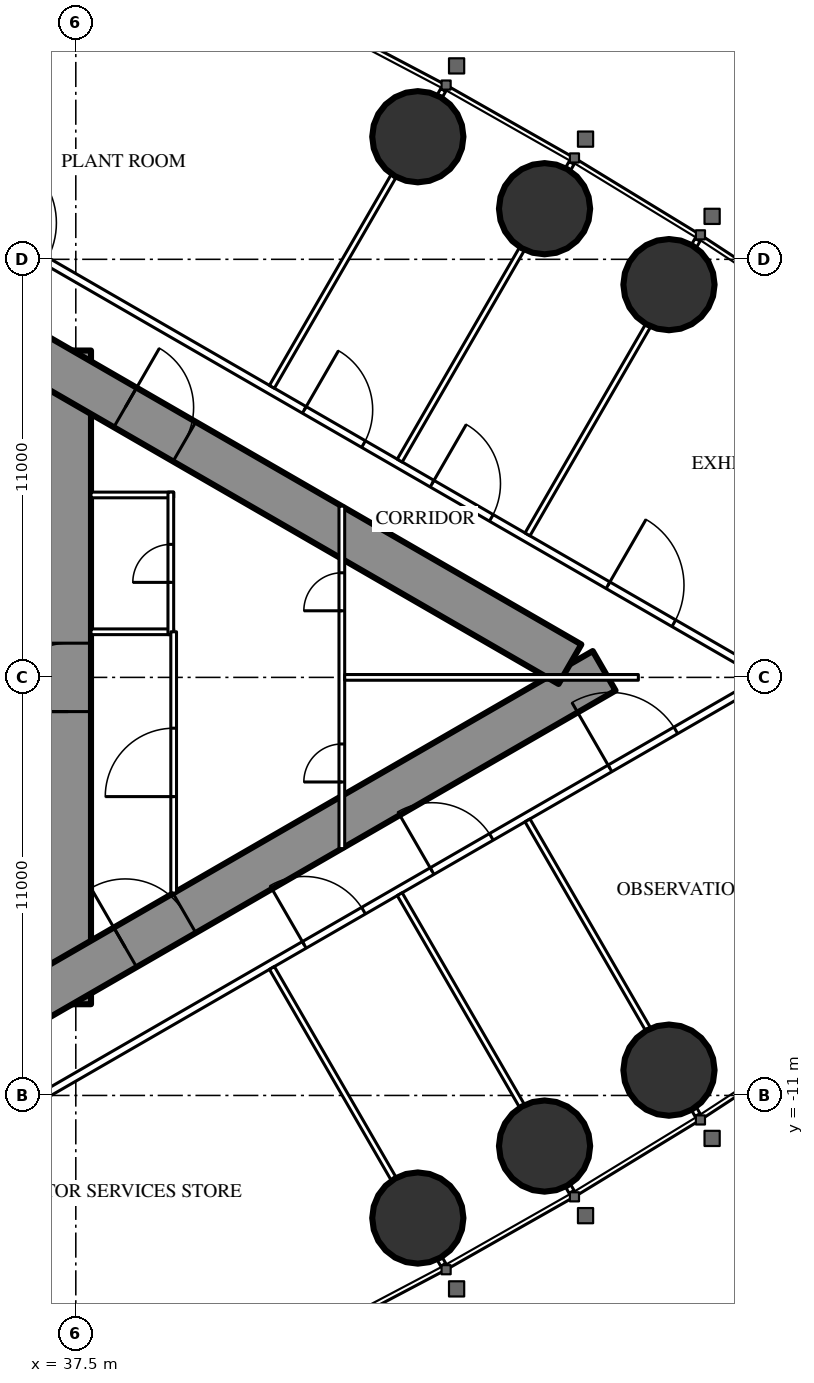
"""IFC4 building model, lengths in metres.
Left out: names, types, materials, properties, quantities, classifications, styles, units other than length and angle.
Written with IfcOpenShell. Run it as: python <this file> out.ifc"""

import sys

from ifc_helpers import new_model, si_unit, direction, frame, frame_2d, origin, origin_2d, place, context, subcontext, project, spatial, rectangle, circle, extrude, element, fill, save


model = new_model("IFC4")
c1 = context("Model", 3, precision=1e-05, world=origin(), true_north=direction((0.0, 1.0)))
c2 = subcontext(c1, "Body", "Model", "MODEL_VIEW")
j1 = project(units=[si_unit("LENGTHUNIT", "METRE"), si_unit("PLANEANGLEUNIT", "RADIAN")], contexts=[c1])
p1 = place(None, origin())
s1 = spatial("IfcSite", under=j1, at=p1, CompositionType="ELEMENT")
p2 = place(p1, origin())
s2 = spatial("IfcBuilding", under=s1, at=p2, CompositionType="ELEMENT")
p3 = place(p2, frame((0.0, 0.0, 257.3)))
s3 = spatial("IfcBuildingStorey", under=s2, at=p3, CompositionType="ELEMENT", Elevation=257.3)
for number, where, z_axis, x_axis in (
    (1, (53.108, 10.334, 0.0), (0.0, 0.0, 1.0), (1.0, 0.0, 0.0)),
    (2, (49.834, 12.332, 0.0), (0.0, 0.0, 1.0), (1.0, 0.0, 0.0)),
    (3, (46.499, 14.226, 0.0), (0.0, 0.0, 1.0), (1.0, 0.0, 0.0)),
    (4, (46.499, -14.226, 0.0), (0.0, 0.0, 1.0), (1.0, 0.0, 0.0)),
    (5, (49.834, -12.332, 0.0), (0.0, 0.0, 1.0), (1.0, 0.0, 0.0)),
    (6, (53.108, -10.334, 0.0), (0.0, 0.0, 1.0), (1.0, 0.0, 0.0)),
):
    element("IfcColumn", number, at=place(p3, frame(where, z_axis=z_axis, x_axis=x_axis)), inside=s3, PredefinedType="COLUMN", context=c2, shape_type="SweptSolid", body=[
        extrude(circle(Radius=1.2, at=origin_2d()), origin(), (0.0, 0.0, 1.0), 6.0),
    ])
p4 = place(p3, frame((37.3, -8.6, 0.0), z_axis=(0.0, 0.0, 1.0), x_axis=(0.0, 1.0, 0.0)))
e7 = element("IfcWall", 7, at=p4, inside=s3, PredefinedType="SHEAR", context=c2, shape_type="SweptSolid", body=[
    extrude(rectangle(XDim=17.2, YDim=1.2, at=frame_2d((8.6, 0.0))), origin(), (0.0, 0.0, 1.0), 6.0),
])
p5 = place(p4, frame((7.7, 0.0, 0.0)))
e8 = element("IfcOpeningElement", 8, at=p5, cuts=e7, PredefinedType="OPENING", context=c2, shape_type="SweptSolid", body=[
    extrude(rectangle(XDim=1.8, YDim=2.2, at=frame_2d((0.9, 1.1))), frame((0.0, 0.61, 0.0), z_axis=(0.0, -1.0, 0.0), x_axis=(1.0, 0.0, 0.0)), (0.0, 0.0, 1.0), 1.22),
])
p6 = place(p3, frame((27.2, -13.8, 0.0), z_axis=(0.0, 0.0, 1.0), x_axis=(0.866027159892, 0.499996958321, 0.0)))
e9 = element("IfcWall", 9, at=p6, inside=s3, PredefinedType="SHEAR", context=c2, shape_type="SweptSolid", body=[
    extrude(rectangle(XDim=27.947, YDim=1.2, at=frame_2d((13.973, 0.0))), origin(), (0.0, 0.0, 1.0), 6.0),
])
p7 = place(p6, frame((4.6, 0.0, 0.0)))
e10 = element("IfcOpeningElement", 10, at=p7, cuts=e9, PredefinedType="OPENING", context=c2, shape_type="SweptSolid", body=[
    extrude(rectangle(XDim=1.0, YDim=2.2, at=frame_2d((0.5, 1.1))), frame((0.0, 0.61, 0.0), z_axis=(0.0, -1.0, 0.0), x_axis=(1.0, 0.0, 0.0)), (0.0, 0.0, 1.0), 1.22),
])
p8 = place(p6, frame((13.395, 0.0, 0.0)))
e11 = element("IfcOpeningElement", 11, at=p8, cuts=e9, PredefinedType="OPENING", context=c2, shape_type="SweptSolid", body=[
    extrude(rectangle(XDim=1.8, YDim=2.2, at=frame_2d((0.9, 1.1))), frame((0.0, 0.61, 0.0), z_axis=(0.0, -1.0, 0.0), x_axis=(1.0, 0.0, 0.0)), (0.0, 0.0, 1.0), 1.22),
])
p9 = place(p3, frame((27.2, 13.8, 0.0), z_axis=(0.0, 0.0, 1.0), x_axis=(0.866024515034, -0.500001539357, 0.0)))
e12 = element("IfcWall", 12, at=p9, inside=s3, PredefinedType="SHEAR", context=c2, shape_type="SweptSolid", body=[
    extrude(rectangle(XDim=26.907, YDim=1.2, at=frame_2d((13.454, 0.0))), origin(), (0.0, 0.0, 1.0), 6.0),
])
p10 = place(p9, frame((4.6, 0.0, 0.0)))
e13 = element("IfcOpeningElement", 13, at=p10, cuts=e12, PredefinedType="OPENING", context=c2, shape_type="SweptSolid", body=[
    extrude(rectangle(XDim=1.0, YDim=2.2, at=frame_2d((0.5, 1.1))), frame((0.0, 0.61, 0.0), z_axis=(0.0, -1.0, 0.0), x_axis=(1.0, 0.0, 0.0)), (0.0, 0.0, 1.0), 1.22),
])
p11 = place(p9, frame((13.395, 0.0, 0.0)))
e14 = element("IfcOpeningElement", 14, at=p11, cuts=e12, PredefinedType="OPENING", context=c2, shape_type="SweptSolid", body=[
    extrude(rectangle(XDim=1.8, YDim=2.2, at=frame_2d((0.9, 1.1))), frame((0.0, 0.61, 0.0), z_axis=(0.0, -1.0, 0.0), x_axis=(1.0, 0.0, 0.0)), (0.0, 0.0, 1.0), 1.22),
])
p12 = place(p3, frame((28.907, -15.47, 0.0), z_axis=(0.0, 0.0, 1.0), x_axis=(0.866023700353, 0.500002950419, 0.0)))
e15 = element("IfcWall", 15, at=p12, inside=s3, PredefinedType="PARTITIONING", context=c2, shape_type="SweptSolid", body=[
    extrude(rectangle(XDim=30.941, YDim=0.2, at=frame_2d((15.47, 0.0))), origin(), (0.0, 0.0, 1.0), 5.75),
])
p13 = place(p12, frame((7.024, 0.0, 0.0)))
e16 = element("IfcOpeningElement", 16, at=p13, cuts=e15, PredefinedType="OPENING", context=c2, shape_type="SweptSolid", body=[
    extrude(rectangle(XDim=2.0, YDim=2.4, at=frame_2d((1.0, 1.2))), frame((0.0, 0.11, 0.0), z_axis=(0.0, -1.0, 0.0), x_axis=(1.0, 0.0, 0.0)), (0.0, 0.0, 1.0), 0.22),
])
p14 = place(p12, frame((16.865, 0.0, 0.0)))
e17 = element("IfcOpeningElement", 17, at=p14, cuts=e15, PredefinedType="OPENING", context=c2, shape_type="SweptSolid", body=[
    extrude(rectangle(XDim=1.8, YDim=2.2, at=frame_2d((0.9, 1.1))), frame((0.0, 0.11, 0.0), z_axis=(0.0, -1.0, 0.0), x_axis=(1.0, 0.0, 0.0)), (0.0, 0.0, 1.0), 0.22),
])
p15 = place(p12, frame((20.748, 0.0, 0.0)))
e18 = element("IfcOpeningElement", 18, at=p15, cuts=e15, PredefinedType="OPENING", context=c2, shape_type="SweptSolid", body=[
    extrude(rectangle(XDim=1.8, YDim=2.2, at=frame_2d((0.9, 1.1))), frame((0.0, 0.11, 0.0), z_axis=(0.0, -1.0, 0.0), x_axis=(1.0, 0.0, 0.0)), (0.0, 0.0, 1.0), 0.22),
])
p16 = place(p12, frame((26.152, 0.0, 0.0)))
e19 = element("IfcOpeningElement", 19, at=p16, cuts=e15, PredefinedType="OPENING", context=c2, shape_type="SweptSolid", body=[
    extrude(rectangle(XDim=2.0, YDim=2.4, at=frame_2d((1.0, 1.2))), frame((0.0, 0.11, 0.0), z_axis=(0.0, -1.0, 0.0), x_axis=(1.0, 0.0, 0.0)), (0.0, 0.0, 1.0), 0.22),
])
p17 = place(p3, frame((28.907, 15.47, 0.0), z_axis=(0.0, 0.0, 1.0), x_axis=(0.866025841386, -0.499999242051, 0.0)))
e20 = element("IfcWall", 20, at=p17, inside=s3, PredefinedType="PARTITIONING", context=c2, shape_type="SweptSolid", body=[
    extrude(rectangle(XDim=30.821, YDim=0.2, at=frame_2d((15.41, 0.0))), origin(), (0.0, 0.0, 1.0), 5.75),
])
p18 = place(p17, frame((26.092, 0.0, 0.0)))
e21 = element("IfcOpeningElement", 21, at=p18, cuts=e20, PredefinedType="OPENING", context=c2, shape_type="SweptSolid", body=[
    extrude(rectangle(XDim=2.0, YDim=2.4, at=frame_2d((1.0, 1.2))), frame((0.0, 0.11, 0.0), z_axis=(0.0, -1.0, 0.0), x_axis=(1.0, 0.0, 0.0)), (0.0, 0.0, 1.0), 0.22),
])
p19 = place(p17, frame((20.748, 0.0, 0.0)))
e22 = element("IfcOpeningElement", 22, at=p19, cuts=e20, PredefinedType="OPENING", context=c2, shape_type="SweptSolid", body=[
    extrude(rectangle(XDim=1.8, YDim=2.2, at=frame_2d((0.9, 1.1))), frame((0.0, 0.11, 0.0), z_axis=(0.0, -1.0, 0.0), x_axis=(1.0, 0.0, 0.0)), (0.0, 0.0, 1.0), 0.22),
])
p20 = place(p17, frame((16.865, 0.0, 0.0)))
e23 = element("IfcOpeningElement", 23, at=p20, cuts=e20, PredefinedType="OPENING", context=c2, shape_type="SweptSolid", body=[
    extrude(rectangle(XDim=1.8, YDim=2.2, at=frame_2d((0.9, 1.1))), frame((0.0, 0.11, 0.0), z_axis=(0.0, -1.0, 0.0), x_axis=(1.0, 0.0, 0.0)), (0.0, 0.0, 1.0), 0.22),
])
p21 = place(p17, frame((7.024, 0.0, 0.0)))
e24 = element("IfcOpeningElement", 24, at=p21, cuts=e20, PredefinedType="OPENING", context=c2, shape_type="SweptSolid", body=[
    extrude(rectangle(XDim=2.0, YDim=2.4, at=frame_2d((1.0, 1.2))), frame((0.0, 0.11, 0.0), z_axis=(0.0, -1.0, 0.0), x_axis=(1.0, 0.0, 0.0)), (0.0, 0.0, 1.0), 0.22),
])
p22 = place(p3, frame((42.66, -7.646, 0.0), z_axis=(0.0, 0.0, 1.0), x_axis=(0.499996592859, -0.866027370889, 0.0)))
e25 = element("IfcWall", 25, at=p22, inside=s3, PredefinedType="PARTITIONING", context=c2, shape_type="SweptSolid", body=[
    extrude(rectangle(XDim=6.398, YDim=0.15, at=frame_2d((3.199, 0.0))), origin(), (0.0, 0.0, 1.0), 4.85),
])
p23 = place(p3, frame((47.079, -15.3, 0.0), z_axis=(0.0, 0.0, 1.0), x_axis=(0.499212083968, -0.866479829667, 0.0)))
e26 = element("IfcWall", 26, at=p23, inside=s3, PredefinedType="PARTITIONING", context=c2, shape_type="SweptSolid", body=[
    extrude(rectangle(XDim=0.179, YDim=0.15, at=frame_2d((0.09, 0.0))), origin(), (0.0, 0.0, 1.0), 4.85),
])
p24 = place(p3, frame((46.023, -5.704, 0.0), z_axis=(0.0, 0.0, 1.0), x_axis=(0.499984478165, -0.866034365135, 0.0)))
e27 = element("IfcWall", 27, at=p24, inside=s3, PredefinedType="PARTITIONING", context=c2, shape_type="SweptSolid", body=[
    extrude(rectangle(XDim=6.426, YDim=0.15, at=frame_2d((3.213, 0.0))), origin(), (0.0, 0.0, 1.0), 4.85),
])
p25 = place(p3, frame((50.456, -13.382, 0.0), z_axis=(0.0, 0.0, 1.0), x_axis=(0.500661834965, -0.865642955848, 0.0)))
e28 = element("IfcWall", 28, at=p25, inside=s3, PredefinedType="PARTITIONING", context=c2, shape_type="SweptSolid", body=[
    extrude(rectangle(XDim=0.18, YDim=0.15, at=frame_2d((0.09, 0.0))), origin(), (0.0, 0.0, 1.0), 4.85),
])
p26 = place(p3, frame((49.385, -3.763, 0.0), z_axis=(0.0, 0.0, 1.0), x_axis=(0.499999447814, -0.866025722589, 0.0)))
e29 = element("IfcWall", 29, at=p26, inside=s3, PredefinedType="PARTITIONING", context=c2, shape_type="SweptSolid", body=[
    extrude(rectangle(XDim=6.333, YDim=0.15, at=frame_2d((3.166, 0.0))), origin(), (0.0, 0.0, 1.0), 4.85),
])
p27 = place(p3, frame((53.771, -11.36, 0.0), z_axis=(0.0, 0.0, 1.0), x_axis=(0.499524978789, -0.866299483762, 0.0)))
e30 = element("IfcWall", 30, at=p27, inside=s3, PredefinedType="PARTITIONING", context=c2, shape_type="SweptSolid", body=[
    extrude(rectangle(XDim=0.178, YDim=0.15, at=frame_2d((0.089, 0.0))), origin(), (0.0, 0.0, 1.0), 4.85),
])
p28 = place(p3, frame((42.66, 7.646, 0.0), z_axis=(0.0, 0.0, 1.0), x_axis=(0.499996592859, 0.866027370889, 0.0)))
e31 = element("IfcWall", 31, at=p28, inside=s3, PredefinedType="PARTITIONING", context=c2, shape_type="SweptSolid", body=[
    extrude(rectangle(XDim=6.398, YDim=0.15, at=frame_2d((3.199, 0.0))), origin(), (0.0, 0.0, 1.0), 4.85),
])
p29 = place(p3, frame((47.079, 15.3, 0.0), z_axis=(0.0, 0.0, 1.0), x_axis=(0.499212083968, 0.866479829667, 0.0)))
e32 = element("IfcWall", 32, at=p29, inside=s3, PredefinedType="PARTITIONING", context=c2, shape_type="SweptSolid", body=[
    extrude(rectangle(XDim=0.179, YDim=0.15, at=frame_2d((0.09, 0.0))), origin(), (0.0, 0.0, 1.0), 4.85),
])
p30 = place(p3, frame((46.023, 5.704, 0.0), z_axis=(0.0, 0.0, 1.0), x_axis=(0.499984478165, 0.866034365135, 0.0)))
e33 = element("IfcWall", 33, at=p30, inside=s3, PredefinedType="PARTITIONING", context=c2, shape_type="SweptSolid", body=[
    extrude(rectangle(XDim=6.426, YDim=0.15, at=frame_2d((3.213, 0.0))), origin(), (0.0, 0.0, 1.0), 4.85),
])
p31 = place(p3, frame((50.456, 13.382, 0.0), z_axis=(0.0, 0.0, 1.0), x_axis=(0.500661834965, 0.865642955848, 0.0)))
e34 = element("IfcWall", 34, at=p31, inside=s3, PredefinedType="PARTITIONING", context=c2, shape_type="SweptSolid", body=[
    extrude(rectangle(XDim=0.18, YDim=0.15, at=frame_2d((0.09, 0.0))), origin(), (0.0, 0.0, 1.0), 4.85),
])
p32 = place(p3, frame((49.385, 3.763, 0.0), z_axis=(0.0, 0.0, 1.0), x_axis=(0.499999447814, 0.866025722589, 0.0)))
e35 = element("IfcWall", 35, at=p32, inside=s3, PredefinedType="PARTITIONING", context=c2, shape_type="SweptSolid", body=[
    extrude(rectangle(XDim=6.333, YDim=0.15, at=frame_2d((3.166, 0.0))), origin(), (0.0, 0.0, 1.0), 4.85),
])
p33 = place(p3, frame((53.771, 11.36, 0.0), z_axis=(0.0, 0.0, 1.0), x_axis=(0.499524978789, 0.866299483762, 0.0)))
e36 = element("IfcWall", 36, at=p33, inside=s3, PredefinedType="PARTITIONING", context=c2, shape_type="SweptSolid", body=[
    extrude(rectangle(XDim=0.178, YDim=0.15, at=frame_2d((0.089, 0.0))), origin(), (0.0, 0.0, 1.0), 4.85),
])
for number, where, z_axis, x_axis in (
    (37, (37.9, 1.2, 0.0), (0.0, 0.0, 1.0), (1.0, 0.0, 0.0)),
    (38, (37.9, 4.8, 0.0), (0.0, 0.0, 1.0), (1.0, 0.0, 0.0)),
):
    element("IfcWall", number, at=place(p3, frame(where, z_axis=z_axis, x_axis=x_axis)), inside=s3, PredefinedType="PARTITIONING", context=c2, shape_type="SweptSolid", body=[
        extrude(rectangle(XDim=2.175, YDim=0.15, at=frame_2d((1.087, 0.0))), origin(), (0.0, 0.0, 1.0), 5.75),
    ])
p34 = place(p3, frame((40.0, 1.125, 0.0), z_axis=(0.0, 0.0, 1.0), x_axis=(0.0, 1.0, 0.0)))
e39 = element("IfcWall", 39, at=p34, inside=s3, PredefinedType="PARTITIONING", context=c2, shape_type="SweptSolid", body=[
    extrude(rectangle(XDim=3.75, YDim=0.15, at=frame_2d((1.875, 0.0))), origin(), (0.0, 0.0, 1.0), 5.75),
])
p35 = place(p34, frame((1.375, 0.0, 0.0)))
e40 = element("IfcOpeningElement", 40, at=p35, cuts=e39, PredefinedType="OPENING", context=c2, shape_type="SweptSolid", body=[
    extrude(rectangle(XDim=1.0, YDim=2.2, at=frame_2d((0.5, 1.1))), frame((0.0, 0.085, 0.0), z_axis=(0.0, -1.0, 0.0), x_axis=(1.0, 0.0, 0.0)), (0.0, 0.0, 1.0), 0.17),
])
p36 = place(p3, frame((40.075, -5.674, 0.0), z_axis=(0.0, 0.0, 1.0), x_axis=(0.0, 1.0, 0.0)))
e41 = element("IfcWall", 41, at=p36, inside=s3, PredefinedType="PARTITIONING", context=c2, shape_type="SweptSolid", body=[
    extrude(rectangle(XDim=6.874, YDim=0.15, at=frame_2d((3.437, 0.0))), origin(), (0.0, 0.0, 1.0), 5.75),
])
p37 = place(p36, frame((2.537, 0.0, 0.0)))
e42 = element("IfcOpeningElement", 42, at=p37, cuts=e41, PredefinedType="OPENING", context=c2, shape_type="SweptSolid", body=[
    extrude(rectangle(XDim=1.8, YDim=2.2, at=frame_2d((0.9, 1.1))), frame((0.0, 0.085, 0.0), z_axis=(0.0, -1.0, 0.0), x_axis=(1.0, 0.0, 0.0)), (0.0, 0.0, 1.0), 0.17),
])
p38 = place(p3, frame((44.5, -4.505, 0.0), z_axis=(0.0, 0.0, 1.0), x_axis=(0.0, 1.0, 0.0)))
e43 = element("IfcWall", 43, at=p38, inside=s3, PredefinedType="PARTITIONING", context=c2, shape_type="SweptSolid", body=[
    extrude(rectangle(XDim=9.009, YDim=0.15, at=frame_2d((4.505, 0.0))), origin(), (0.0, 0.0, 1.0), 5.75),
])
p39 = place(p38, frame((1.752, 0.0, 0.0)))
e44 = element("IfcOpeningElement", 44, at=p39, cuts=e43, PredefinedType="OPENING", context=c2, shape_type="SweptSolid", body=[
    extrude(rectangle(XDim=1.0, YDim=2.2, at=frame_2d((0.5, 1.1))), frame((0.0, 0.085, 0.0), z_axis=(0.0, -1.0, 0.0), x_axis=(1.0, 0.0, 0.0)), (0.0, 0.0, 1.0), 0.17),
])
p40 = place(p38, frame((6.257, 0.0, 0.0)))
e45 = element("IfcOpeningElement", 45, at=p40, cuts=e43, PredefinedType="OPENING", context=c2, shape_type="SweptSolid", body=[
    extrude(rectangle(XDim=1.0, YDim=2.2, at=frame_2d((0.5, 1.1))), frame((0.0, 0.085, 0.0), z_axis=(0.0, -1.0, 0.0), x_axis=(1.0, 0.0, 0.0)), (0.0, 0.0, 1.0), 0.17),
])
p41 = place(p3, frame((44.575, 0.0, 0.0), z_axis=(0.0, 0.0, 1.0), x_axis=(1.0, 0.0, 0.0)))
e46 = element("IfcWall", 46, at=p41, inside=s3, PredefinedType="PARTITIONING", context=c2, shape_type="SweptSolid", body=[
    extrude(rectangle(XDim=7.727, YDim=0.15, at=frame_2d((3.864, 0.0))), origin(), (0.0, 0.0, 1.0), 4.85),
])
p42 = place(p14, origin())
e47 = element("IfcDoor", 47, at=p42, inside=s3, OperationType="DOUBLE_DOOR_SINGLE_SWING", PredefinedType="DOOR", context=c2, shape_type="SweptSolid", body=[
    extrude(rectangle(XDim=1.8, YDim=2.2, at=frame_2d((0.9, 1.1))), frame((0.0, 0.025, 0.0), z_axis=(0.0, -1.0, 0.0), x_axis=(1.0, 0.0, 0.0)), (0.0, 0.0, 1.0), 0.05),
])
fill(e17, e47)
p43 = place(p15, origin())
e48 = element("IfcDoor", 48, at=p43, inside=s3, OperationType="DOUBLE_DOOR_SINGLE_SWING", PredefinedType="DOOR", context=c2, shape_type="SweptSolid", body=[
    extrude(rectangle(XDim=1.8, YDim=2.2, at=frame_2d((0.9, 1.1))), frame((0.0, 0.025, 0.0), z_axis=(0.0, -1.0, 0.0), x_axis=(1.0, 0.0, 0.0)), (0.0, 0.0, 1.0), 0.05),
])
fill(e18, e48)
p44 = place(p16, origin())
e49 = element("IfcDoor", 49, at=p44, inside=s3, OperationType="DOUBLE_DOOR_SINGLE_SWING", PredefinedType="DOOR", context=c2, shape_type="SweptSolid", body=[
    extrude(rectangle(XDim=2.0, YDim=2.4, at=frame_2d((1.0, 1.2))), frame((0.0, 0.025, 0.0), z_axis=(0.0, -1.0, 0.0), x_axis=(1.0, 0.0, 0.0)), (0.0, 0.0, 1.0), 0.05),
])
fill(e19, e49)
p45 = place(p18, origin())
e50 = element("IfcDoor", 50, at=p45, inside=s3, OperationType="DOUBLE_DOOR_SINGLE_SWING", PredefinedType="DOOR", context=c2, shape_type="SweptSolid", body=[
    extrude(rectangle(XDim=2.0, YDim=2.4, at=frame_2d((1.0, 1.2))), frame((0.0, 0.025, 0.0), z_axis=(0.0, -1.0, 0.0), x_axis=(1.0, 0.0, 0.0)), (0.0, 0.0, 1.0), 0.05),
])
fill(e21, e50)
p46 = place(p19, origin())
e51 = element("IfcDoor", 51, at=p46, inside=s3, OperationType="DOUBLE_DOOR_SINGLE_SWING", PredefinedType="DOOR", context=c2, shape_type="SweptSolid", body=[
    extrude(rectangle(XDim=1.8, YDim=2.2, at=frame_2d((0.9, 1.1))), frame((0.0, 0.025, 0.0), z_axis=(0.0, -1.0, 0.0), x_axis=(1.0, 0.0, 0.0)), (0.0, 0.0, 1.0), 0.05),
])
fill(e22, e51)
p47 = place(p20, origin())
e52 = element("IfcDoor", 52, at=p47, inside=s3, OperationType="DOUBLE_DOOR_SINGLE_SWING", PredefinedType="DOOR", context=c2, shape_type="SweptSolid", body=[
    extrude(rectangle(XDim=1.8, YDim=2.2, at=frame_2d((0.9, 1.1))), frame((0.0, 0.025, 0.0), z_axis=(0.0, -1.0, 0.0), x_axis=(1.0, 0.0, 0.0)), (0.0, 0.0, 1.0), 0.05),
])
fill(e23, e52)
p48 = place(p35, origin())
e53 = element("IfcDoor", 53, at=p48, inside=s3, OperationType="SINGLE_SWING_LEFT", PredefinedType="DOOR", context=c2, shape_type="SweptSolid", body=[
    extrude(rectangle(XDim=1.0, YDim=2.2, at=frame_2d((0.5, 1.1))), frame((0.0, 0.025, 0.0), z_axis=(0.0, -1.0, 0.0), x_axis=(1.0, 0.0, 0.0)), (0.0, 0.0, 1.0), 0.05),
])
fill(e40, e53)
p49 = place(p37, origin())
e54 = element("IfcDoor", 54, at=p49, inside=s3, OperationType="DOUBLE_DOOR_SINGLE_SWING", PredefinedType="DOOR", context=c2, shape_type="SweptSolid", body=[
    extrude(rectangle(XDim=1.8, YDim=2.2, at=frame_2d((0.9, 1.1))), frame((0.0, 0.025, 0.0), z_axis=(0.0, -1.0, 0.0), x_axis=(1.0, 0.0, 0.0)), (0.0, 0.0, 1.0), 0.05),
])
fill(e42, e54)
p50 = place(p39, origin())
e55 = element("IfcDoor", 55, at=p50, inside=s3, OperationType="SINGLE_SWING_LEFT", PredefinedType="DOOR", context=c2, shape_type="SweptSolid", body=[
    extrude(rectangle(XDim=1.0, YDim=2.2, at=frame_2d((0.5, 1.1))), frame((0.0, 0.025, 0.0), z_axis=(0.0, -1.0, 0.0), x_axis=(1.0, 0.0, 0.0)), (0.0, 0.0, 1.0), 0.05),
])
fill(e44, e55)
p51 = place(p40, origin())
e56 = element("IfcDoor", 56, at=p51, inside=s3, OperationType="SINGLE_SWING_LEFT", PredefinedType="DOOR", context=c2, shape_type="SweptSolid", body=[
    extrude(rectangle(XDim=1.0, YDim=2.2, at=frame_2d((0.5, 1.1))), frame((0.0, 0.025, 0.0), z_axis=(0.0, -1.0, 0.0), x_axis=(1.0, 0.0, 0.0)), (0.0, 0.0, 1.0), 0.05),
])
fill(e45, e56)
p52 = place(p8, origin())
e57 = element("IfcDoor", 57, at=p52, inside=s3, OperationType="DOUBLE_DOOR_SINGLE_SWING", PredefinedType="DOOR", context=c2, shape_type="SweptSolid", body=[
    extrude(rectangle(XDim=1.8, YDim=2.2, at=frame_2d((0.9, 1.1))), frame((0.0, 0.025, 0.0), z_axis=(0.0, -1.0, 0.0), x_axis=(1.0, 0.0, 0.0)), (0.0, 0.0, 1.0), 0.05),
])
fill(e11, e57)
p53 = place(p11, origin())
e58 = element("IfcDoor", 58, at=p53, inside=s3, OperationType="DOUBLE_DOOR_SINGLE_SWING", PredefinedType="DOOR", context=c2, shape_type="SweptSolid", body=[
    extrude(rectangle(XDim=1.8, YDim=2.2, at=frame_2d((0.9, 1.1))), frame((0.0, 0.025, 0.0), z_axis=(0.0, -1.0, 0.0), x_axis=(1.0, 0.0, 0.0)), (0.0, 0.0, 1.0), 0.05),
])
fill(e14, e58)
p54 = place(p5, origin())
e59 = element("IfcDoor", 59, at=p54, inside=s3, OperationType="DOUBLE_DOOR_SINGLE_SWING", PredefinedType="DOOR", context=c2, shape_type="SweptSolid", body=[
    extrude(rectangle(XDim=1.8, YDim=2.2, at=frame_2d((0.9, 1.1))), frame((0.0, 0.025, 0.0), z_axis=(0.0, -1.0, 0.0), x_axis=(1.0, 0.0, 0.0)), (0.0, 0.0, 1.0), 0.05),
])
fill(e8, e59)
save(model, sys.argv[1])
